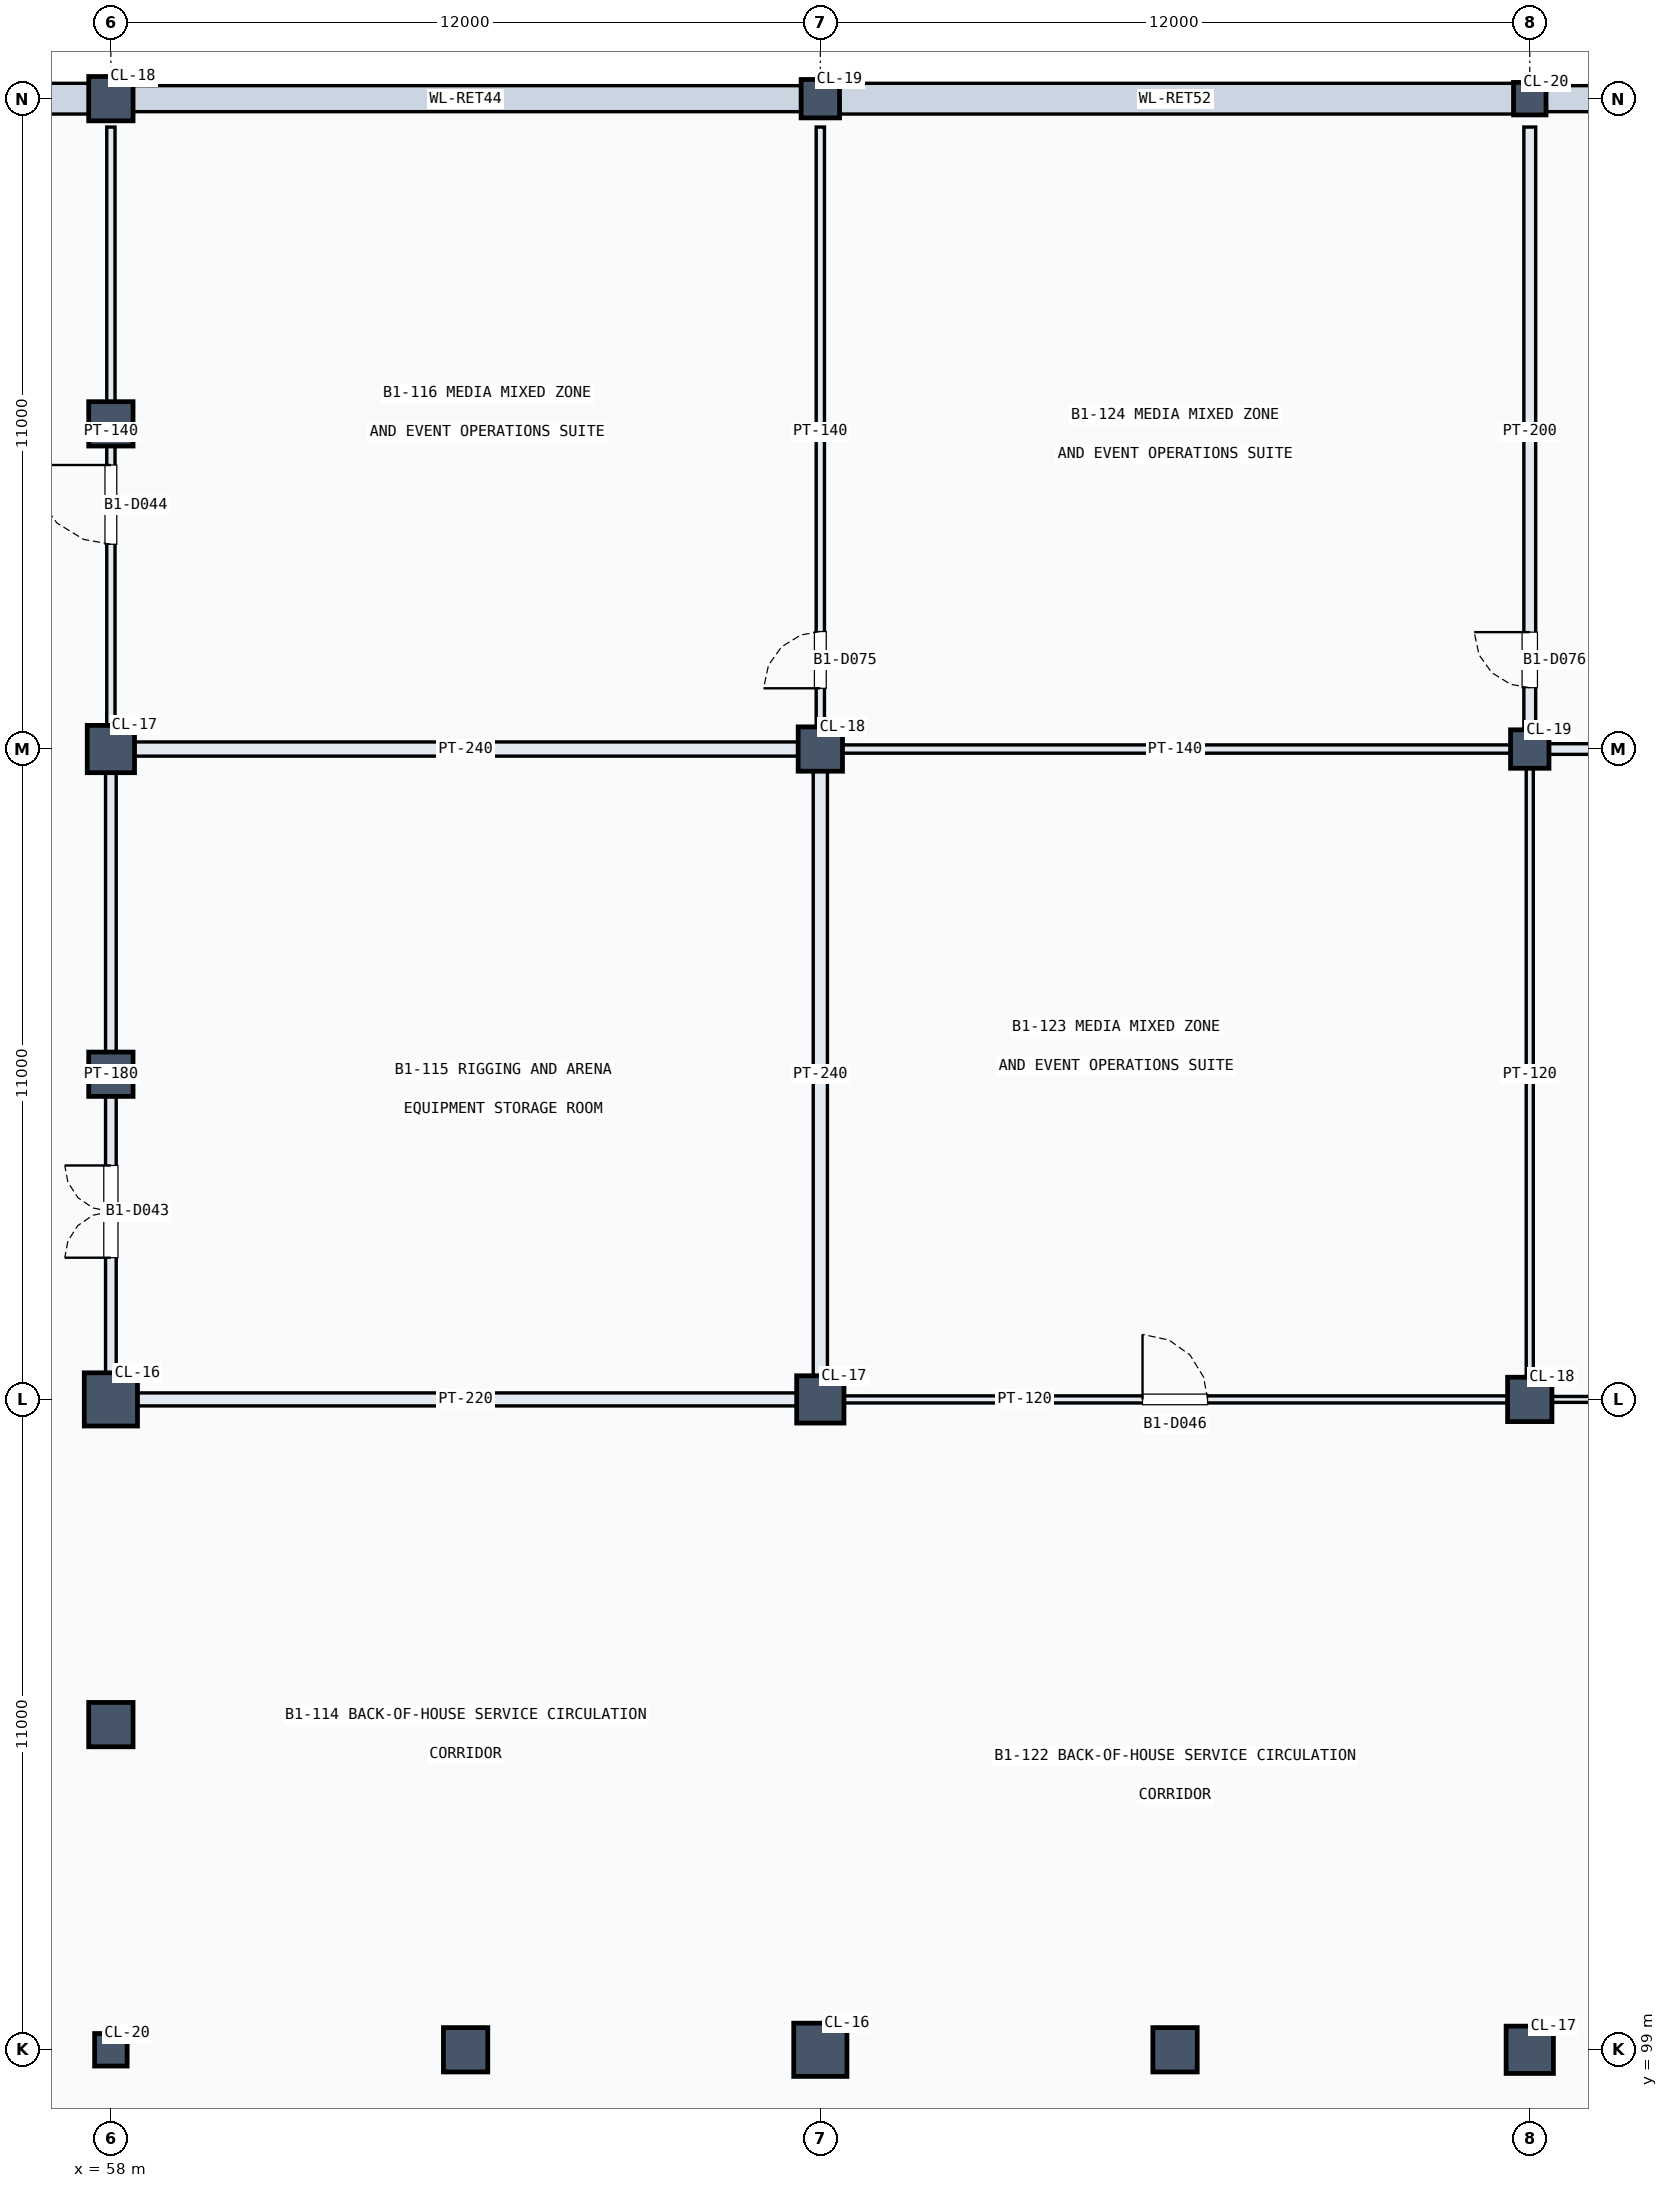
"""IFC4 building model, lengths in metres.
Left out: names, types, materials, properties, quantities, classifications, styles, units other than length and angle.
Written with IfcOpenShell. Run it as: python <this file> out.ifc"""

import sys

from ifc_helpers import new_model, si_unit, direction, frame, frame_2d, origin, origin_2d, place, context, subcontext, project, spatial, rectangle, circle, extrude, element, fill, save


model = new_model("IFC4")
c1 = context("Model", 3, precision=1e-05, world=origin(), true_north=direction((0.0, 1.0)))
c2 = subcontext(c1, "Body", "Model", "MODEL_VIEW")
j1 = project(units=[si_unit("LENGTHUNIT", "METRE"), si_unit("PLANEANGLEUNIT", "RADIAN")], contexts=[c1])
p1 = place(None, origin())
s1 = spatial("IfcSite", under=j1, at=p1, CompositionType="ELEMENT")
p2 = place(p1, origin())
s2 = spatial("IfcBuilding", under=s1, at=p2, CompositionType="ELEMENT")
p3 = place(p2, frame((0.0, 0.0, -5.4)))
s3 = spatial("IfcBuildingStorey", under=s2, at=p3, CompositionType="ELEMENT", Elevation=-5.4)
p4 = place(p3, frame((58.0, 99.0, 0.0), z_axis=(0.0, 0.0, 1.0), x_axis=(1.0, 0.0, 0.0)))
e1 = element("IfcColumn", 1, at=p4, inside=s3, PredefinedType="COLUMN", context=c2, shape_type="SweptSolid", body=[
    extrude(circle(Radius=0.275, at=origin_2d()), origin(), (0.0, 0.0, 1.0), 5.4),
])
p5 = place(p3, frame((58.0, 110.0, 0.0), z_axis=(0.0, 0.0, 1.0), x_axis=(1.0, 0.0, 0.0)))
e2 = element("IfcColumn", 2, at=p5, inside=s3, PredefinedType="COLUMN", context=c2, shape_type="SweptSolid", body=[
    extrude(circle(Radius=0.45, at=origin_2d()), origin(), (0.0, 0.0, 1.0), 5.4),
])
p6 = place(p3, frame((58.0, 121.0, 0.0), z_axis=(0.0, 0.0, 1.0), x_axis=(1.0, 0.0, 0.0)))
e3 = element("IfcColumn", 3, at=p6, inside=s3, PredefinedType="COLUMN", context=c2, shape_type="SweptSolid", body=[
    extrude(circle(Radius=0.4, at=origin_2d()), origin(), (0.0, 0.0, 1.0), 5.4),
])
p7 = place(p3, frame((58.0, 132.0, 0.0), z_axis=(0.0, 0.0, 1.0), x_axis=(1.0, 0.0, 0.0)))
e4 = element("IfcColumn", 4, at=p7, inside=s3, PredefinedType="COLUMN", context=c2, shape_type="SweptSolid", body=[
    extrude(circle(Radius=0.375, at=origin_2d()), origin(), (0.0, 0.0, 1.0), 5.4),
])
p8 = place(p3, frame((70.0, 99.0, 0.0), z_axis=(0.0, 0.0, 1.0), x_axis=(1.0, 0.0, 0.0)))
e5 = element("IfcColumn", 5, at=p8, inside=s3, PredefinedType="COLUMN", context=c2, shape_type="SweptSolid", body=[
    extrude(circle(Radius=0.45, at=origin_2d()), origin(), (0.0, 0.0, 1.0), 5.4),
])
p9 = place(p3, frame((70.0, 110.0, 0.0), z_axis=(0.0, 0.0, 1.0), x_axis=(1.0, 0.0, 0.0)))
e6 = element("IfcColumn", 6, at=p9, inside=s3, PredefinedType="COLUMN", context=c2, shape_type="SweptSolid", body=[
    extrude(circle(Radius=0.4, at=origin_2d()), origin(), (0.0, 0.0, 1.0), 5.4),
])
p10 = place(p3, frame((70.0, 121.0, 0.0), z_axis=(0.0, 0.0, 1.0), x_axis=(1.0, 0.0, 0.0)))
e7 = element("IfcColumn", 7, at=p10, inside=s3, PredefinedType="COLUMN", context=c2, shape_type="SweptSolid", body=[
    extrude(circle(Radius=0.375, at=origin_2d()), origin(), (0.0, 0.0, 1.0), 5.4),
])
p11 = place(p3, frame((70.0, 132.0, 0.0), z_axis=(0.0, 0.0, 1.0), x_axis=(1.0, 0.0, 0.0)))
e8 = element("IfcColumn", 8, at=p11, inside=s3, PredefinedType="COLUMN", context=c2, shape_type="SweptSolid", body=[
    extrude(circle(Radius=0.325, at=origin_2d()), origin(), (0.0, 0.0, 1.0), 5.4),
])
p12 = place(p3, frame((82.0, 99.0, 0.0), z_axis=(0.0, 0.0, 1.0), x_axis=(1.0, 0.0, 0.0)))
e9 = element("IfcColumn", 9, at=p12, inside=s3, PredefinedType="COLUMN", context=c2, shape_type="SweptSolid", body=[
    extrude(circle(Radius=0.4, at=origin_2d()), origin(), (0.0, 0.0, 1.0), 5.4),
])
p13 = place(p3, frame((82.0, 110.0, 0.0), z_axis=(0.0, 0.0, 1.0), x_axis=(1.0, 0.0, 0.0)))
e10 = element("IfcColumn", 10, at=p13, inside=s3, PredefinedType="COLUMN", context=c2, shape_type="SweptSolid", body=[
    extrude(circle(Radius=0.375, at=origin_2d()), origin(), (0.0, 0.0, 1.0), 5.4),
])
p14 = place(p3, frame((82.0, 121.0, 0.0), z_axis=(0.0, 0.0, 1.0), x_axis=(1.0, 0.0, 0.0)))
e11 = element("IfcColumn", 11, at=p14, inside=s3, PredefinedType="COLUMN", context=c2, shape_type="SweptSolid", body=[
    extrude(circle(Radius=0.325, at=origin_2d()), origin(), (0.0, 0.0, 1.0), 5.4),
])
p15 = place(p3, frame((82.0, 132.0, 0.0), z_axis=(0.0, 0.0, 1.0), x_axis=(1.0, 0.0, 0.0)))
e12 = element("IfcColumn", 12, at=p15, inside=s3, PredefinedType="COLUMN", context=c2, shape_type="SweptSolid", body=[
    extrude(circle(Radius=0.275, at=origin_2d()), origin(), (0.0, 0.0, 1.0), 5.4),
])
for number, where, z_axis, x_axis in (
    (13, (64.0, 99.0, 0.0), (0.0, 0.0, 1.0), (1.0, 0.0, 0.0)),
    (14, (76.0, 99.0, 0.0), (0.0, 0.0, 1.0), (1.0, 0.0, 0.0)),
    (15, (58.0, 104.5, 0.0), (0.0, 0.0, 1.0), (1.0, 0.0, 0.0)),
    (16, (58.0, 115.5, 0.0), (0.0, 0.0, 1.0), (1.0, 0.0, 0.0)),
    (17, (58.0, 126.5, 0.0), (0.0, 0.0, 1.0), (1.0, 0.0, 0.0)),
):
    element("IfcColumn", number, at=place(p3, frame(where, z_axis=z_axis, x_axis=x_axis)), inside=s3, PredefinedType="COLUMN", context=c2, shape_type="SweptSolid", body=[
        extrude(circle(Radius=0.375, at=origin_2d()), origin(), (0.0, 0.0, 1.0), 5.4),
    ])
p16 = place(p3, frame((46.22, 132.0, 0.0), z_axis=(0.0, 0.0, 1.0), x_axis=(1.0, 0.0, 0.0)))
e18 = element("IfcWall", 18, at=p16, inside=s3, PredefinedType="SOLIDWALL", context=c2, shape_type="SweptSolid", body=[
    extrude(rectangle(XDim=11.56, YDim=0.52, at=frame_2d((5.78, 0.0))), origin(), (0.0, 0.0, 1.0), 4.23),
])
p17 = place(p3, frame((58.22, 132.0, 0.0), z_axis=(0.0, 0.0, 1.0), x_axis=(1.0, 0.0, 0.0)))
e19 = element("IfcWall", 19, at=p17, inside=s3, PredefinedType="SOLIDWALL", context=c2, shape_type="SweptSolid", body=[
    extrude(rectangle(XDim=11.56, YDim=0.44, at=frame_2d((5.78, 0.0))), origin(), (0.0, 0.0, 1.0), 4.23),
])
p18 = place(p3, frame((70.22, 132.0, 0.0), z_axis=(0.0, 0.0, 1.0), x_axis=(1.0, 0.0, 0.0)))
e20 = element("IfcWall", 20, at=p18, inside=s3, PredefinedType="SOLIDWALL", context=c2, shape_type="SweptSolid", body=[
    extrude(rectangle(XDim=11.56, YDim=0.52, at=frame_2d((5.78, 0.0))), origin(), (0.0, 0.0, 1.0), 4.418),
])
p19 = place(p3, frame((82.22, 132.0, 0.0), z_axis=(0.0, 0.0, 1.0), x_axis=(1.0, 0.0, 0.0)))
e21 = element("IfcWall", 21, at=p19, inside=s3, PredefinedType="SOLIDWALL", context=c2, shape_type="SweptSolid", body=[
    extrude(rectangle(XDim=11.56, YDim=0.44, at=frame_2d((5.78, 0.0))), origin(), (0.0, 0.0, 1.0), 4.418),
])
p20 = place(p3, frame((58.0, 110.22, 0.0), z_axis=(0.0, 0.0, 1.0), x_axis=(0.0, 1.0, 0.0)))
e22 = element("IfcWall", 22, at=p20, inside=s3, PredefinedType="PARTITIONING", context=c2, shape_type="SweptSolid", body=[
    extrude(rectangle(XDim=10.56, YDim=0.18, at=frame_2d((5.28, 0.0))), origin(), (0.0, 0.0, 1.0), 4.08),
])
p21 = place(p20, frame((2.177, 0.0, 0.0)))
e23 = element("IfcOpeningElement", 23, at=p21, cuts=e22, PredefinedType="OPENING", context=c2, shape_type="SweptSolid", body=[
    extrude(rectangle(XDim=1.56, YDim=2.2, at=frame_2d((0.78, 1.1))), frame((0.0, 0.1, 0.0), z_axis=(0.0, -1.0, 0.0), x_axis=(1.0, 0.0, 0.0)), (0.0, 0.0, 1.0), 0.2),
])
p22 = place(p3, frame((58.0, 121.22, 0.0), z_axis=(0.0, 0.0, 1.0), x_axis=(0.0, 1.0, 0.0)))
e24 = element("IfcWall", 24, at=p22, inside=s3, PredefinedType="PARTITIONING", context=c2, shape_type="SweptSolid", body=[
    extrude(rectangle(XDim=10.3, YDim=0.14, at=frame_2d((5.15, 0.0))), origin(), (0.0, 0.0, 1.0), 4.08),
])
p23 = place(p22, frame((3.244, 0.0, 0.0)))
e25 = element("IfcOpeningElement", 25, at=p23, cuts=e24, PredefinedType="OPENING", context=c2, shape_type="SweptSolid", body=[
    extrude(rectangle(XDim=1.34, YDim=2.15, at=frame_2d((0.67, 1.075))), frame((0.0, 0.08, 0.0), z_axis=(0.0, -1.0, 0.0), x_axis=(1.0, 0.0, 0.0)), (0.0, 0.0, 1.0), 0.16),
])
p24 = place(p3, frame((58.22, 110.0, 0.0), z_axis=(0.0, 0.0, 1.0), x_axis=(1.0, 0.0, 0.0)))
e26 = element("IfcWall", 26, at=p24, inside=s3, PredefinedType="PARTITIONING", context=c2, shape_type="SweptSolid", body=[
    extrude(rectangle(XDim=11.56, YDim=0.22, at=frame_2d((5.78, 0.0))), origin(), (0.0, 0.0, 1.0), 4.08),
])
p25 = place(p3, frame((70.22, 110.0, 0.0), z_axis=(0.0, 0.0, 1.0), x_axis=(1.0, 0.0, 0.0)))
e27 = element("IfcWall", 27, at=p25, inside=s3, PredefinedType="PARTITIONING", context=c2, shape_type="SweptSolid", body=[
    extrude(rectangle(XDim=11.56, YDim=0.12, at=frame_2d((5.78, 0.0))), origin(), (0.0, 0.0, 1.0), 4.08),
])
p26 = place(p25, frame((5.23, 0.0, 0.0)))
e28 = element("IfcOpeningElement", 28, at=p26, cuts=e27, PredefinedType="OPENING", context=c2, shape_type="SweptSolid", body=[
    extrude(rectangle(XDim=1.1, YDim=2.1, at=frame_2d((0.55, 1.05))), frame((0.0, 0.07, 0.0), z_axis=(0.0, -1.0, 0.0), x_axis=(1.0, 0.0, 0.0)), (0.0, 0.0, 1.0), 0.14),
])
p27 = place(p3, frame((82.22, 110.0, 0.0), z_axis=(0.0, 0.0, 1.0), x_axis=(1.0, 0.0, 0.0)))
e29 = element("IfcWall", 29, at=p27, inside=s3, PredefinedType="PARTITIONING", context=c2, shape_type="SweptSolid", body=[
    extrude(rectangle(XDim=11.56, YDim=0.1, at=frame_2d((5.78, 0.0))), origin(), (0.0, 0.0, 1.0), 4.23),
])
p28 = place(p27, frame((4.805, 0.0, 0.0)))
e30 = element("IfcOpeningElement", 30, at=p28, cuts=e29, PredefinedType="OPENING", context=c2, shape_type="SweptSolid", body=[
    extrude(rectangle(XDim=1.95, YDim=2.4, at=frame_2d((0.975, 1.2))), frame((0.0, 0.06, 0.0), z_axis=(0.0, -1.0, 0.0), x_axis=(1.0, 0.0, 0.0)), (0.0, 0.0, 1.0), 0.12),
])
p29 = place(p3, frame((58.22, 121.0, 0.0), z_axis=(0.0, 0.0, 1.0), x_axis=(1.0, 0.0, 0.0)))
e31 = element("IfcWall", 31, at=p29, inside=s3, PredefinedType="PARTITIONING", context=c2, shape_type="SweptSolid", body=[
    extrude(rectangle(XDim=11.56, YDim=0.24, at=frame_2d((5.78, 0.0))), origin(), (0.0, 0.0, 1.0), 4.08),
])
p30 = place(p3, frame((70.0, 110.22, 0.0), z_axis=(0.0, 0.0, 1.0), x_axis=(0.0, 1.0, 0.0)))
e32 = element("IfcWall", 32, at=p30, inside=s3, PredefinedType="PARTITIONING", context=c2, shape_type="SweptSolid", body=[
    extrude(rectangle(XDim=10.56, YDim=0.24, at=frame_2d((5.28, 0.0))), origin(), (0.0, 0.0, 1.0), 4.08),
])
p31 = place(p3, frame((70.0, 121.22, 0.0), z_axis=(0.0, 0.0, 1.0), x_axis=(0.0, 1.0, 0.0)))
e33 = element("IfcWall", 33, at=p31, inside=s3, PredefinedType="PARTITIONING", context=c2, shape_type="SweptSolid", body=[
    extrude(rectangle(XDim=10.3, YDim=0.14, at=frame_2d((5.15, 0.0))), origin(), (0.0, 0.0, 1.0), 4.28),
])
p32 = place(p31, frame((0.808, 0.0, 0.0)))
e34 = element("IfcOpeningElement", 34, at=p32, cuts=e33, PredefinedType="OPENING", context=c2, shape_type="SweptSolid", body=[
    extrude(rectangle(XDim=0.96, YDim=2.15, at=frame_2d((0.48, 1.075))), frame((0.0, 0.08, 0.0), z_axis=(0.0, -1.0, 0.0), x_axis=(1.0, 0.0, 0.0)), (0.0, 0.0, 1.0), 0.16),
])
p33 = place(p3, frame((70.22, 121.0, 0.0), z_axis=(0.0, 0.0, 1.0), x_axis=(1.0, 0.0, 0.0)))
e35 = element("IfcWall", 35, at=p33, inside=s3, PredefinedType="PARTITIONING", context=c2, shape_type="SweptSolid", body=[
    extrude(rectangle(XDim=11.56, YDim=0.14, at=frame_2d((5.78, 0.0))), origin(), (0.0, 0.0, 1.0), 4.28),
])
p34 = place(p3, frame((82.0, 110.22, 0.0), z_axis=(0.0, 0.0, 1.0), x_axis=(0.0, 1.0, 0.0)))
e36 = element("IfcWall", 36, at=p34, inside=s3, PredefinedType="PARTITIONING", context=c2, shape_type="SweptSolid", body=[
    extrude(rectangle(XDim=10.56, YDim=0.12, at=frame_2d((5.28, 0.0))), origin(), (0.0, 0.0, 1.0), 4.23),
])
p35 = place(p3, frame((82.0, 121.22, 0.0), z_axis=(0.0, 0.0, 1.0), x_axis=(0.0, 1.0, 0.0)))
e37 = element("IfcWall", 37, at=p35, inside=s3, PredefinedType="PARTITIONING", context=c2, shape_type="SweptSolid", body=[
    extrude(rectangle(XDim=10.3, YDim=0.2, at=frame_2d((5.15, 0.0))), origin(), (0.0, 0.0, 1.0), 4.33),
])
p36 = place(p35, frame((0.817, 0.0, 0.0)))
e38 = element("IfcOpeningElement", 38, at=p36, cuts=e37, PredefinedType="OPENING", context=c2, shape_type="SweptSolid", body=[
    extrude(rectangle(XDim=0.94, YDim=2.15, at=frame_2d((0.47, 1.075))), frame((0.0, 0.11, 0.0), z_axis=(0.0, -1.0, 0.0), x_axis=(1.0, 0.0, 0.0)), (0.0, 0.0, 1.0), 0.22),
])
p37 = place(p3, frame((82.22, 121.0, 0.0), z_axis=(0.0, 0.0, 1.0), x_axis=(1.0, 0.0, 0.0)))
e39 = element("IfcWall", 39, at=p37, inside=s3, PredefinedType="PARTITIONING", context=c2, shape_type="SweptSolid", body=[
    extrude(rectangle(XDim=11.56, YDim=0.18, at=frame_2d((5.78, 0.0))), origin(), (0.0, 0.0, 1.0), 4.33),
])
p38 = place(p21, origin())
e40 = element("IfcDoor", 40, at=p38, inside=s3, OperationType="DOUBLE_DOOR_SINGLE_SWING", PredefinedType="DOOR", context=c2, shape_type="SweptSolid", body=[
    extrude(rectangle(XDim=1.56, YDim=2.2, at=frame_2d((0.78, 1.1))), frame((0.0, 0.025, 0.0), z_axis=(0.0, -1.0, 0.0), x_axis=(1.0, 0.0, 0.0)), (0.0, 0.0, 1.0), 0.05),
])
fill(e23, e40)
p39 = place(p23, origin())
e41 = element("IfcDoor", 41, at=p39, inside=s3, OperationType="SINGLE_SWING_RIGHT", PredefinedType="DOOR", context=c2, shape_type="SweptSolid", body=[
    extrude(rectangle(XDim=1.34, YDim=2.15, at=frame_2d((0.67, 1.075))), frame((0.0, 0.025, 0.0), z_axis=(0.0, -1.0, 0.0), x_axis=(1.0, 0.0, 0.0)), (0.0, 0.0, 1.0), 0.05),
])
fill(e25, e41)
p40 = place(p26, origin())
e42 = element("IfcDoor", 42, at=p40, inside=s3, OperationType="SINGLE_SWING_LEFT", PredefinedType="DOOR", context=c2, shape_type="SweptSolid", body=[
    extrude(rectangle(XDim=1.1, YDim=2.1, at=frame_2d((0.55, 1.05))), frame((0.0, 0.025, 0.0), z_axis=(0.0, -1.0, 0.0), x_axis=(1.0, 0.0, 0.0)), (0.0, 0.0, 1.0), 0.05),
])
fill(e28, e42)
p41 = place(p32, origin())
e43 = element("IfcDoor", 43, at=p41, inside=s3, OperationType="SINGLE_SWING_LEFT", PredefinedType="DOOR", context=c2, shape_type="SweptSolid", body=[
    extrude(rectangle(XDim=0.96, YDim=2.15, at=frame_2d((0.48, 1.075))), frame((0.0, 0.025, 0.0), z_axis=(0.0, -1.0, 0.0), x_axis=(1.0, 0.0, 0.0)), (0.0, 0.0, 1.0), 0.05),
])
fill(e34, e43)
p42 = place(p36, origin())
e44 = element("IfcDoor", 44, at=p42, inside=s3, OperationType="SINGLE_SWING_RIGHT", PredefinedType="DOOR", context=c2, shape_type="SweptSolid", body=[
    extrude(rectangle(XDim=0.94, YDim=2.15, at=frame_2d((0.47, 1.075))), frame((0.0, 0.025, 0.0), z_axis=(0.0, -1.0, 0.0), x_axis=(1.0, 0.0, 0.0)), (0.0, 0.0, 1.0), 0.05),
])
fill(e38, e44)
save(model, sys.argv[1])
